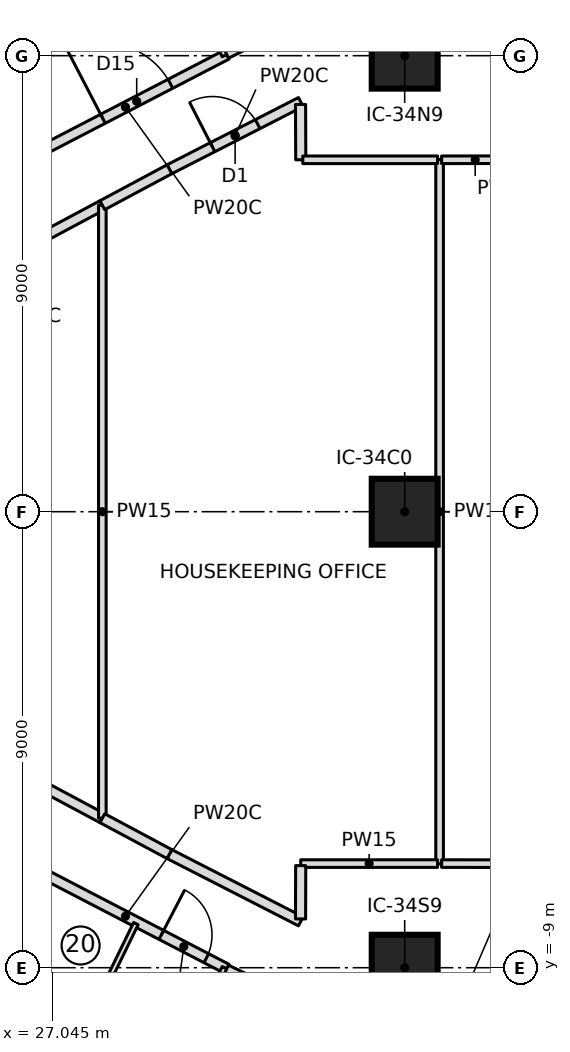
"""IFC4 building model, lengths in metres.
Left out: names, types, materials, properties, quantities, classifications, styles, units other than length and angle.
Written with IfcOpenShell. Run it as: python <this file> out.ifc"""

import sys

from ifc_helpers import new_model, si_unit, direction, frame, frame_2d, origin, origin_2d, place, context, subcontext, project, spatial, rectangle, extrude, element, fill, save


model = new_model("IFC4")
c1 = context("Model", 3, precision=1e-05, world=origin(), true_north=direction((0.0, 1.0)))
c2 = subcontext(c1, "Body", "Model", "MODEL_VIEW")
j1 = project(units=[si_unit("LENGTHUNIT", "METRE"), si_unit("PLANEANGLEUNIT", "RADIAN")], contexts=[c1])
p1 = place(None, origin())
s1 = spatial("IfcSite", under=j1, at=p1, CompositionType="ELEMENT")
p2 = place(p1, origin())
s2 = spatial("IfcBuilding", under=s1, at=p2, CompositionType="ELEMENT")
p3 = place(p2, frame((0.0, 0.0, 46.7)))
s3 = spatial("IfcBuildingStorey", under=s2, at=p3, CompositionType="ELEMENT", Elevation=46.7)
for number, where, z_axis, x_axis in (
    (1, (34.0, -9.0, 0.0), (0.0, 0.0, 1.0), (1.0, 0.0, 0.0)),
    (2, (34.0, 0.0, 0.0), (0.0, 0.0, 1.0), (1.0, 0.0, 0.0)),
    (3, (34.0, 9.0, 0.0), (0.0, 0.0, 1.0), (1.0, 0.0, 0.0)),
):
    element("IfcColumn", number, at=place(p3, frame(where, z_axis=z_axis, x_axis=x_axis)), inside=s3, PredefinedType="COLUMN", context=c2, shape_type="SweptSolid", body=[
        extrude(rectangle(XDim=1.3, YDim=1.3, at=origin_2d()), origin(), (0.0, 0.0, 1.0), 3.55),
    ])
p4 = place(p3, frame((26.49, 6.948, 0.0), z_axis=(0.0, 0.0, 1.0), x_axis=(0.887638836985, 0.460540220911, 0.0)))
e4 = element("IfcWall", 4, at=p4, inside=s3, PredefinedType="PARTITIONING", context=c2, shape_type="SweptSolid", body=[
    extrude(rectangle(XDim=4.504, YDim=0.2, at=frame_2d((2.252, 0.0))), origin(), (0.0, 0.0, 1.0), 3.25),
])
p5 = place(p4, frame((1.752, 0.0, 0.0)))
e5 = element("IfcOpeningElement", 5, at=p5, cuts=e4, PredefinedType="OPENING", context=c2, shape_type="SweptSolid", body=[
    extrude(rectangle(XDim=1.5, YDim=2.1, at=frame_2d((0.75, 1.05))), frame((0.0, 0.11, 0.0), z_axis=(0.0, -1.0, 0.0), x_axis=(1.0, 0.0, 0.0)), (0.0, 0.0, 1.0), 0.22),
])
p6 = place(p3, frame((30.489, 9.022, 0.0), z_axis=(0.0, 0.0, 1.0), x_axis=(-0.43822365664, 0.898865967072, 0.0)))
e6 = element("IfcWall", 6, at=p6, inside=s3, PredefinedType="PARTITIONING", context=c2, shape_type="SweptSolid", body=[
    extrude(rectangle(XDim=7.601, YDim=0.2, at=frame_2d((3.801, 0.0))), origin(), (0.0, 0.0, 1.0), 3.25),
])
p7 = place(p3, frame((30.48, 9.04, 0.0), z_axis=(0.0, 0.0, 1.0), x_axis=(0.894989913054, 0.446086376761, 0.0)))
e7 = element("IfcWall", 7, at=p7, inside=s3, PredefinedType="PARTITIONING", context=c2, shape_type="SweptSolid", body=[
    extrude(rectangle(XDim=4.506, YDim=0.2, at=frame_2d((2.253, 0.0))), origin(), (0.0, 0.0, 1.0), 3.25),
])
p8 = place(p7, frame((1.35, 0.0, 0.0)))
e8 = element("IfcOpeningElement", 8, at=p8, cuts=e7, PredefinedType="OPENING", context=c2, shape_type="SweptSolid", body=[
    extrude(rectangle(XDim=1.5, YDim=2.1, at=frame_2d((0.75, 1.05))), frame((0.0, 0.11, 0.0), z_axis=(0.0, -1.0, 0.0), x_axis=(1.0, 0.0, 0.0)), (0.0, 0.0, 1.0), 0.22),
])
p9 = place(p3, frame((26.49, -6.948, 0.0), z_axis=(0.0, 0.0, 1.0), x_axis=(0.887638836985, -0.460540220911, 0.0)))
e9 = element("IfcWall", 9, at=p9, inside=s3, PredefinedType="PARTITIONING", context=c2, shape_type="SweptSolid", body=[
    extrude(rectangle(XDim=4.504, YDim=0.2, at=frame_2d((2.252, 0.0))), origin(), (0.0, 0.0, 1.0), 3.25),
])
p10 = place(p9, frame((3.05, 0.0, 0.0)))
e10 = element("IfcOpeningElement", 10, at=p10, cuts=e9, PredefinedType="OPENING", context=c2, shape_type="SweptSolid", body=[
    extrude(rectangle(XDim=1.0, YDim=2.1, at=frame_2d((0.5, 1.05))), frame((0.0, 0.11, 0.0), z_axis=(0.0, -1.0, 0.0), x_axis=(1.0, 0.0, 0.0)), (0.0, 0.0, 1.0), 0.22),
])
p11 = place(p3, frame((28.695, -8.13, 0.0), z_axis=(0.0, 0.0, 1.0), x_axis=(-0.438229314017, -0.898863208912, 0.0)))
e11 = element("IfcWall", 11, at=p11, inside=s3, PredefinedType="PARTITIONING", context=c2, shape_type="SweptSolid", body=[
    extrude(rectangle(XDim=2.277, YDim=0.1, at=frame_2d((1.139, 0.0))), origin(), (0.0, 0.0, 1.0), 3.25),
])
p12 = place(p3, frame((27.595, -10.125, 0.0), z_axis=(0.0, 0.0, 1.0), x_axis=(-0.881666905428, 0.471872300388, 0.0)))
e12 = element("IfcWall", 12, at=p12, inside=s3, PredefinedType="PARTITIONING", context=c2, shape_type="SweptSolid", body=[
    extrude(rectangle(XDim=2.387, YDim=0.1, at=frame_2d((1.194, 0.0))), origin(), (0.0, 0.0, 1.0), 3.25),
])
p13 = place(p12, frame((0.8, 0.0, 0.0)))
e13 = element("IfcOpeningElement", 13, at=p13, cuts=e12, PredefinedType="OPENING", context=c2, shape_type="SweptSolid", body=[
    extrude(rectangle(XDim=0.8, YDim=2.1, at=frame_2d((0.4, 1.05))), frame((0.0, 0.06, 0.0), z_axis=(0.0, -1.0, 0.0), x_axis=(1.0, 0.0, 0.0)), (0.0, 0.0, 1.0), 0.12),
])
p14 = place(p3, frame((27.157, -15.854, 0.0), z_axis=(0.0, 0.0, 1.0), x_axis=(0.43822365664, 0.898865967072, 0.0)))
e14 = element("IfcWall", 14, at=p14, inside=s3, PredefinedType="PARTITIONING", context=c2, shape_type="SweptSolid", body=[
    extrude(rectangle(XDim=7.601, YDim=0.2, at=frame_2d((3.801, 0.0))), origin(), (0.0, 0.0, 1.0), 3.25),
])
p15 = place(p3, frame((30.48, -9.04, 0.0), z_axis=(0.0, 0.0, 1.0), x_axis=(0.900265089934, -0.43534212735, 0.0)))
e15 = element("IfcWall", 15, at=p15, inside=s3, PredefinedType="PARTITIONING", context=c2, shape_type="SweptSolid", body=[
    extrude(rectangle(XDim=9.013, YDim=0.2, at=frame_2d((4.506, 0.0))), origin(), (0.0, 0.0, 1.0), 3.25),
])
p16 = place(p15, frame((3.9, 0.0, 0.0)))
e16 = element("IfcOpeningElement", 16, at=p16, cuts=e15, PredefinedType="OPENING", context=c2, shape_type="SweptSolid", body=[
    extrude(rectangle(XDim=1.0, YDim=2.1, at=frame_2d((0.5, 1.05))), frame((0.0, 0.11, 0.0), z_axis=(0.0, -1.0, 0.0), x_axis=(1.0, 0.0, 0.0)), (0.0, 0.0, 1.0), 0.22),
])
for number, where, z_axis, x_axis in (
    (17, (28.033, -6.049, 0.0), (0.0, 0.0, 1.0), (-0.882, 0.472, 0.0)),
    (18, (25.817, 4.863, 0.0), (0.0, 0.0, 1.0), (0.882, 0.472, 0.0)),
):
    element("IfcWall", number, at=place(p3, frame(where, z_axis=z_axis, x_axis=x_axis)), inside=s3, PredefinedType="PARTITIONING", context=c2, shape_type="SweptSolid", body=[
        extrude(rectangle(XDim=2.514, YDim=0.2, at=frame_2d((1.257, 0.0))), origin(), (0.0, 0.0, 1.0), 3.25),
    ])
p17 = place(p3, frame((28.033, -6.049, 0.0), z_axis=(0.0, 0.0, 1.0), x_axis=(0.0, 1.0, 0.0)))
e19 = element("IfcWall", 19, at=p17, inside=s3, PredefinedType="PARTITIONING", context=c2, shape_type="SweptSolid", body=[
    extrude(rectangle(XDim=12.099, YDim=0.15, at=frame_2d((6.049, 0.0))), origin(), (0.0, 0.0, 1.0), 3.25),
])
p18 = place(p3, frame((29.357, 6.758, 0.0), z_axis=(0.0, 0.0, 1.0), x_axis=(0.890213377055, 0.455543788579, 0.0)))
e20 = element("IfcWall", 20, at=p18, inside=s3, PredefinedType="PARTITIONING", context=c2, shape_type="SweptSolid", body=[
    extrude(rectangle(XDim=2.912, YDim=0.2, at=frame_2d((1.456, 0.0))), origin(), (0.0, 0.0, 1.0), 3.25),
])
p19 = place(p18, frame((0.956, 0.0, 0.0)))
e21 = element("IfcOpeningElement", 21, at=p19, cuts=e20, PredefinedType="OPENING", context=c2, shape_type="SweptSolid", body=[
    extrude(rectangle(XDim=1.0, YDim=2.1, at=frame_2d((0.5, 1.05))), frame((0.0, 0.11, 0.0), z_axis=(0.0, -1.0, 0.0), x_axis=(1.0, 0.0, 0.0)), (0.0, 0.0, 1.0), 0.22),
])
p20 = place(p3, frame((31.95, -8.085, 0.0), z_axis=(0.0, 0.0, 1.0), x_axis=(-0.890213377055, 0.455543788579, 0.0)))
e22 = element("IfcWall", 22, at=p20, inside=s3, PredefinedType="PARTITIONING", context=c2, shape_type="SweptSolid", body=[
    extrude(rectangle(XDim=2.912, YDim=0.2, at=frame_2d((1.456, 0.0))), origin(), (0.0, 0.0, 1.0), 3.25),
])
for number, where, z_axis, x_axis in (
    (23, (29.357, -6.758, 0.0), (0.0, 0.0, 1.0), (-0.882, 0.472, 0.0)),
    (24, (28.033, 6.049, 0.0), (0.0, 0.0, 1.0), (0.882, 0.472, 0.0)),
):
    element("IfcWall", number, at=place(p3, frame(where, z_axis=z_axis, x_axis=x_axis)), inside=s3, PredefinedType="PARTITIONING", context=c2, shape_type="SweptSolid", body=[
        extrude(rectangle(XDim=1.502, YDim=0.2, at=frame_2d((0.751, 0.0))), origin(), (0.0, 0.0, 1.0), 3.25),
    ])
p21 = place(p3, frame((34.689, -6.95, 0.0), z_axis=(0.0, 0.0, 1.0), x_axis=(0.0, 1.0, 0.0)))
e25 = element("IfcWall", 25, at=p21, inside=s3, PredefinedType="PARTITIONING", context=c2, shape_type="SweptSolid", body=[
    extrude(rectangle(XDim=13.9, YDim=0.15, at=frame_2d((6.95, 0.0))), origin(), (0.0, 0.0, 1.0), 3.25),
])
p22 = place(p3, frame((31.945, 8.037, 0.0), z_axis=(0.0, 0.0, 1.0), x_axis=(0.003576195281, -0.999993605393, 0.0)))
e26 = element("IfcWall", 26, at=p22, inside=s3, PredefinedType="PARTITIONING", context=c2, shape_type="SweptSolid", body=[
    extrude(rectangle(XDim=1.092, YDim=0.2, at=frame_2d((0.546, 0.0))), origin(), (0.0, 0.0, 1.0), 3.25),
])
p23 = place(p3, frame((31.989, 6.945, 0.0), z_axis=(0.0, 0.0, 1.0), x_axis=(1.0, 0.0, 0.0)))
e27 = element("IfcWall", 27, at=p23, inside=s3, PredefinedType="PARTITIONING", context=c2, shape_type="SweptSolid", body=[
    extrude(rectangle(XDim=2.66, YDim=0.15, at=frame_2d((1.33, 0.0))), origin(), (0.0, 0.0, 1.0), 3.25),
])
p24 = place(p3, frame((34.649, -6.945, 0.0), z_axis=(0.0, 0.0, 1.0), x_axis=(-0.999999995915, -9.0391394e-05, 0.0)))
e28 = element("IfcWall", 28, at=p24, inside=s3, PredefinedType="PARTITIONING", context=c2, shape_type="SweptSolid", body=[
    extrude(rectangle(XDim=2.701, YDim=0.15, at=frame_2d((1.351, 0.0))), origin(), (0.0, 0.0, 1.0), 3.25),
])
p25 = place(p3, frame((31.948, -6.985, 0.0), z_axis=(0.0, 0.0, 1.0), x_axis=(-0.00278485808, -0.999996122275, 0.0)))
e29 = element("IfcWall", 29, at=p25, inside=s3, PredefinedType="PARTITIONING", context=c2, shape_type="SweptSolid", body=[
    extrude(rectangle(XDim=1.052, YDim=0.2, at=frame_2d((0.526, 0.0))), origin(), (0.0, 0.0, 1.0), 3.25),
])
p26 = place(p3, frame((36.014, -6.947, 0.0), z_axis=(0.0, 0.0, 1.0), x_axis=(-0.999999115498, 0.001330038725, 0.0)))
e30 = element("IfcWall", 30, at=p26, inside=s3, PredefinedType="PARTITIONING", context=c2, shape_type="SweptSolid", body=[
    extrude(rectangle(XDim=1.285, YDim=0.15, at=frame_2d((0.643, 0.0))), origin(), (0.0, 0.0, 1.0), 3.25),
])
p27 = place(p3, frame((34.729, 6.945, 0.0), z_axis=(0.0, 0.0, 1.0), x_axis=(0.999999168148, 0.001289845988, 0.0)))
e31 = element("IfcWall", 31, at=p27, inside=s3, PredefinedType="PARTITIONING", context=c2, shape_type="SweptSolid", body=[
    extrude(rectangle(XDim=1.325, YDim=0.15, at=frame_2d((0.663, 0.0))), origin(), (0.0, 0.0, 1.0), 3.25),
])
p28 = place(p5, origin())
e32 = element("IfcDoor", 32, at=p28, inside=s3, OperationType="DOUBLE_DOOR_SINGLE_SWING", PredefinedType="DOOR", context=c2, shape_type="SweptSolid", body=[
    extrude(rectangle(XDim=1.5, YDim=2.1, at=frame_2d((0.75, 1.05))), frame((0.0, 0.025, 0.0), z_axis=(0.0, -1.0, 0.0), x_axis=(1.0, 0.0, 0.0)), (0.0, 0.0, 1.0), 0.05),
])
fill(e5, e32)
p29 = place(p10, origin())
e33 = element("IfcDoor", 33, at=p29, inside=s3, OperationType="SINGLE_SWING_RIGHT", PredefinedType="DOOR", context=c2, shape_type="SweptSolid", body=[
    extrude(rectangle(XDim=1.0, YDim=2.1, at=frame_2d((0.5, 1.05))), frame((0.0, 0.025, 0.0), z_axis=(0.0, -1.0, 0.0), x_axis=(1.0, 0.0, 0.0)), (0.0, 0.0, 1.0), 0.05),
])
fill(e10, e33)
p30 = place(p19, origin())
e34 = element("IfcDoor", 34, at=p30, inside=s3, OperationType="SINGLE_SWING_LEFT", PredefinedType="DOOR", context=c2, shape_type="SweptSolid", body=[
    extrude(rectangle(XDim=1.0, YDim=2.1, at=frame_2d((0.5, 1.05))), frame((0.0, 0.025, 0.0), z_axis=(0.0, -1.0, 0.0), x_axis=(1.0, 0.0, 0.0)), (0.0, 0.0, 1.0), 0.05),
])
fill(e21, e34)
save(model, sys.argv[1])
